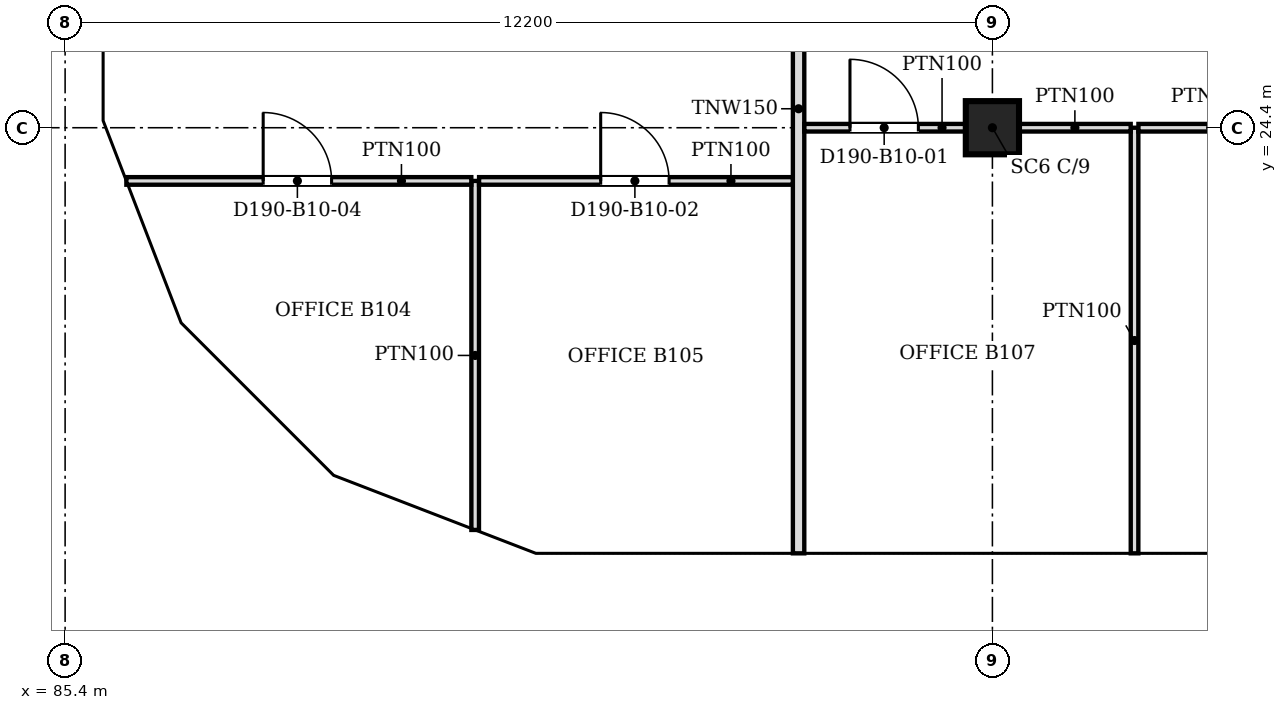
"""IFC4 building model, lengths in metres.
Left out: names, types, materials, properties, quantities, classifications, styles, units other than length and angle.
Written with IfcOpenShell. Run it as: python <this file> out.ifc"""

import sys

from ifc_helpers import new_model, si_unit, direction, frame, frame_2d, origin, origin_2d, place, context, subcontext, project, spatial, polyline, rectangle, outline, extrude, faceted_brep, source, transform, mapped, element, fill, save


model = new_model("IFC4")
c1 = context("Model", 3, precision=1e-05, world=origin(), true_north=direction((0.0, 1.0)))
c2 = subcontext(c1, "Body", "Model", "MODEL_VIEW")
j1 = project(units=[si_unit("LENGTHUNIT", "METRE"), si_unit("PLANEANGLEUNIT", "RADIAN")], contexts=[c1])
p1 = place(None, origin())
s1 = spatial("IfcSite", under=j1, at=p1, CompositionType="ELEMENT")
p2 = place(p1, origin())
s2 = spatial("IfcBuilding", under=s1, at=p2, CompositionType="ELEMENT")
p3 = place(p2, frame((0.0, 0.0, 95.2)))
s3 = spatial("IfcBuildingStorey", under=s2, at=p3, CompositionType="ELEMENT", Elevation=95.2)
p4 = place(p3, frame((97.6, 24.4, 0.0), z_axis=(0.0, 0.0, 1.0), x_axis=(1.0, 0.0, 0.0)))
e1 = element("IfcColumn", 1, at=p4, inside=s3, PredefinedType="COLUMN", context=c2, shape_type="SweptSolid", body=[
    extrude(rectangle(XDim=0.7, YDim=0.7, at=origin_2d()), origin(), (0.0, 0.0, 1.0), 3.6),
])
m1 = source(origin(), c2, "Body", "Brep", [
    faceted_brep([(3.05, -0.25, 0.0), (0.047, -0.25, 3.8), (0.0, -0.25, 3.74), (0.0, -0.25, 0.0), (0.093, 0.25, 3.741), (3.05, 0.25, 0.0), (0.093, 0.25, 0.0), (0.047, 0.0, 3.8)], [[[0, 1, 2, 3]], [[4, 5, 6]], [[5, 4, 7, 1, 0]], [[2, 1, 7]], [[6, 5, 0, 3]], [[6, 3, 2, 7, 4]]]),
])
p5 = place(p3, frame((91.5, 18.55, 0.0), z_axis=(0.0, 0.0, 1.0), x_axis=(1.0, 0.0, 0.0)))
e2 = element("IfcWall", 2, at=p5, inside=s3, PredefinedType="SOLIDWALL", context=c2, shape_type="MappedRepresentation", body=[
    mapped(m1, transform((0.0, 0.0, 0.0), scale=1.0)),
])
m2 = source(origin(), c2, "Body", "SweptSolid", [
    extrude(outline(polyline([(2.534, 0.25), (0.247, 3.144), (0.247, 0.25), (2.534, 0.25)])), frame((0.0, 0.26, 0.0), z_axis=(0.0, -1.0, 0.0), x_axis=(1.0, 0.0, 0.0)), (0.0, 0.0, 1.0), 0.52),
])
p6 = place(p5, origin())
e3 = element("IfcOpeningElement", 3, at=p6, cuts=e2, PredefinedType="OPENING", context=c2, shape_type="MappedRepresentation", body=[
    mapped(m2, transform((0.0, 0.0, 0.0), scale=1.0)),
])
m3 = source(origin(), c2, "Body", "Brep", [
    faceted_brep([(2.997, -0.25, 3.741), (2.95, -0.25, 3.8), (0.0, -0.25, 0.0), (2.997, -0.25, 0.0), (0.053, 0.25, 0.068), (2.904, 0.25, 3.74), (2.904, 0.25, 0.0), (0.053, 0.25, 0.0), (2.95, 0.0, 3.8), (0.0, 0.0, 0.0)], [[[0, 1, 2, 3]], [[4, 5, 6, 7]], [[8, 1, 0]], [[5, 4, 9, 2, 1, 8]], [[7, 6, 3, 2, 9]], [[7, 9, 4]], [[3, 6, 5, 8, 0]]]),
])
p7 = place(p3, frame((88.794, 19.612, 0.0), z_axis=(0.0, 0.0, 1.0), x_axis=(0.933000876937, -0.359874094142, 0.0)))
e4 = element("IfcWall", 4, at=p7, inside=s3, PredefinedType="SOLIDWALL", context=c2, shape_type="MappedRepresentation", body=[
    mapped(m3, transform((0.0, 0.0, 0.0), scale=1.0)),
])
m4 = source(origin(), c2, "Body", "SweptSolid", [
    extrude(outline(polyline([(2.75, 3.135), (0.511, 0.25), (2.75, 0.25), (2.75, 3.135)])), frame((0.0, 0.26, 0.0), z_axis=(0.0, -1.0, 0.0), x_axis=(1.0, 0.0, 0.0)), (0.0, 0.0, 1.0), 0.52),
])
p8 = place(p7, origin())
e5 = element("IfcOpeningElement", 5, at=p8, cuts=e4, PredefinedType="OPENING", context=c2, shape_type="MappedRepresentation", body=[
    mapped(m4, transform((0.0, 0.0, 0.0), scale=1.0)),
])
m5 = source(origin(), c2, "Body", "Brep", [
    faceted_brep([(6.1, -0.25, 0.0), (3.05, -0.25, 3.8), (0.0, -0.25, 0.0), (6.1, -0.25, 0.0), (0.0, 0.25, 0.0), (3.05, 0.25, 3.8), (6.1, 0.25, 0.0), (6.1, 0.25, 0.0)], [[[0, 1, 2, 3]], [[4, 5, 6, 7]], [[6, 5, 1, 0]], [[5, 4, 2, 1]], [[4, 7, 3, 2]], [[3, 7, 6, 0]]]),
])
p9 = place(p3, frame((94.55, 18.55, 0.0), z_axis=(0.0, 0.0, 1.0), x_axis=(1.0, 0.0, 0.0)))
e6 = element("IfcWall", 6, at=p9, inside=s3, PredefinedType="SOLIDWALL", context=c2, shape_type="MappedRepresentation", body=[
    mapped(m5, transform((0.0, 0.0, 0.0), scale=1.0)),
])
m6 = source(origin(), c2, "Body", "SweptSolid", [
    extrude(outline(polyline([(5.579, 0.25), (3.05, 3.401), (0.521, 0.25), (5.579, 0.25)])), frame((0.0, 0.26, 0.0), z_axis=(0.0, -1.0, 0.0), x_axis=(1.0, 0.0, 0.0)), (0.0, 0.0, 1.0), 0.52),
])
p10 = place(p9, origin())
e7 = element("IfcOpeningElement", 7, at=p10, cuts=e6, PredefinedType="OPENING", context=c2, shape_type="MappedRepresentation", body=[
    mapped(m6, transform((0.0, 0.0, 0.0), scale=1.0)),
])
m7 = source(origin(), c2, "Body", "Brep", [
    faceted_brep([(6.053, -0.25, 0.0), (3.05, -0.25, 3.8), (0.0, -0.25, 0.0), (0.0, 0.25, 0.0), (3.05, 0.25, 3.8), (6.007, 0.25, 0.059), (6.007, 0.25, 0.0), (6.053, 0.0, 0.0)], [[[0, 1, 2]], [[3, 4, 5, 6]], [[5, 4, 1, 0, 7]], [[4, 3, 2, 1]], [[3, 6, 7, 0, 2]], [[7, 6, 5]]]),
])
p11 = place(p3, frame((85.65, 30.5, 0.0), z_axis=(0.0, 0.0, 1.0), x_axis=(0.0, -1.0, 0.0)))
e8 = element("IfcWall", 8, at=p11, inside=s3, PredefinedType="SOLIDWALL", context=c2, shape_type="MappedRepresentation", body=[
    mapped(m7, transform((0.0, 0.0, 0.0), scale=1.0)),
])
m8 = source(origin(), c2, "Body", "SweptSolid", [
    extrude(outline(polyline([(5.537, 0.25), (3.049, 3.399), (0.521, 0.25), (5.537, 0.25)])), frame((0.0, 0.26, 0.0), z_axis=(0.0, -1.0, 0.0), x_axis=(1.0, 0.0, 0.0)), (0.0, 0.0, 1.0), 0.52),
])
p12 = place(p11, origin())
e9 = element("IfcOpeningElement", 9, at=p12, cuts=e8, PredefinedType="OPENING", context=c2, shape_type="MappedRepresentation", body=[
    mapped(m8, transform((0.0, 0.0, 0.0), scale=1.0)),
])
m9 = source(origin(), c2, "Body", "Brep", [
    faceted_brep([(3.003, -0.25, 3.732), (2.95, -0.25, 3.8), (0.0, -0.25, 0.0), (3.003, -0.25, 0.0), (0.047, 0.25, 0.06), (2.898, 0.25, 3.732), (2.898, 0.25, 0.0), (0.047, 0.25, 0.0), (2.95, 0.0, 3.8), (0.0, 0.0, 0.0)], [[[0, 1, 2, 3]], [[4, 5, 6, 7]], [[8, 1, 0]], [[5, 4, 9, 2, 1, 8]], [[7, 6, 3, 2, 9]], [[7, 9, 4]], [[3, 6, 5, 8, 0]]]),
])
p13 = place(p3, frame((85.65, 24.447, 0.0), z_axis=(0.0, 0.0, 1.0), x_axis=(0.35992665181, -0.932980602862, 0.0)))
e10 = element("IfcWall", 10, at=p13, inside=s3, PredefinedType="SOLIDWALL", context=c2, shape_type="MappedRepresentation", body=[
    mapped(m9, transform((0.0, 0.0, 0.0), scale=1.0)),
])
p14 = place(p13, origin())
e11 = element("IfcOpeningElement", 11, at=p14, cuts=e10, PredefinedType="OPENING", context=c2, shape_type="MappedRepresentation", body=[
    mapped(m4, transform((0.0, 0.0, 0.0), scale=1.0)),
])
m10 = source(origin(), c2, "Body", "Brep", [
    faceted_brep([(2.997, -0.25, 0.0), (0.053, -0.25, 3.8), (0.0, -0.25, 3.732), (0.0, -0.25, 0.0), (0.106, 0.25, 3.732), (2.944, 0.25, 0.068), (2.944, 0.25, 0.0), (0.106, 0.25, 0.0), (0.053, 0.0, 3.8), (2.997, 0.0, 0.0)], [[[0, 1, 2, 3]], [[4, 5, 6, 7]], [[5, 4, 8, 1, 0, 9]], [[2, 1, 8]], [[7, 6, 9, 0, 3]], [[7, 3, 2, 8, 4]], [[9, 6, 5]]]),
])
p15 = place(p3, frame((86.675, 21.731, 0.0), z_axis=(0.0, 0.0, 1.0), x_axis=(0.707106781187, -0.707106781187, 0.0)))
e12 = element("IfcWall", 12, at=p15, inside=s3, PredefinedType="SOLIDWALL", context=c2, shape_type="MappedRepresentation", body=[
    mapped(m10, transform((0.0, 0.0, 0.0), scale=1.0)),
])
m11 = source(origin(), c2, "Body", "SweptSolid", [
    extrude(outline(polyline([(2.487, 0.25), (0.253, 3.134), (0.253, 0.25), (2.487, 0.25)])), frame((0.0, 0.26, 0.0), z_axis=(0.0, -1.0, 0.0), x_axis=(1.0, 0.0, 0.0)), (0.0, 0.0, 1.0), 0.52),
])
p16 = place(p15, origin())
e13 = element("IfcOpeningElement", 13, at=p16, cuts=e12, PredefinedType="OPENING", context=c2, shape_type="MappedRepresentation", body=[
    mapped(m11, transform((0.0, 0.0, 0.0), scale=1.0)),
])
p17 = place(p2, frame((0.0, 0.0, 99.0)))
s4 = spatial("IfcBuildingStorey", under=s2, at=p17, CompositionType="ELEMENT", Elevation=99.0)
m12 = source(origin(), c2, "Body", "Brep", [
    faceted_brep([(3.003, -0.25, 0.0), (6.053, -0.25, 3.8), (3.003, -0.25, 7.6), (0.0, -0.25, 3.8), (0.047, 0.25, 3.859), (3.003, 0.25, 7.6), (6.053, 0.25, 3.8), (3.003, 0.25, 0.0), (0.047, 0.25, 3.741), (0.0, 0.0, 3.8)], [[[0, 1, 2, 3]], [[4, 5, 6, 7, 8]], [[7, 6, 1, 0]], [[6, 5, 2, 1]], [[5, 4, 9, 3, 2]], [[8, 7, 0, 3, 9]], [[8, 9, 4]]]),
])
p18 = place(p17, frame((91.547, 18.55, -3.8), z_axis=(0.0, 0.0, 1.0), x_axis=(1.0, 0.0, 0.0)))
e14 = element("IfcWall", 14, at=p18, inside=s4, PredefinedType="SOLIDWALL", context=c2, shape_type="MappedRepresentation", body=[
    mapped(m12, transform((0.0, 0.0, 0.0), scale=1.0)),
])
m13 = source(origin(), c2, "Body", "SweptSolid", [
    extrude(outline(polyline([(3.005, 0.401), (5.733, 3.8), (3.005, 7.199), (0.319, 3.8), (3.005, 0.401)])), frame((0.0, 0.26, 0.0), z_axis=(0.0, -1.0, 0.0), x_axis=(1.0, 0.0, 0.0)), (0.0, 0.0, 1.0), 0.52),
])
p19 = place(p18, origin())
e15 = element("IfcOpeningElement", 15, at=p19, cuts=e14, PredefinedType="OPENING", context=c2, shape_type="MappedRepresentation", body=[
    mapped(m13, transform((0.0, 0.0, 0.0), scale=1.0)),
])
m14 = source(origin(), c2, "Body", "Brep", [
    faceted_brep([(3.05, -0.25, 0.0), (6.1, -0.25, 3.8), (6.1, -0.25, 3.8), (3.05, -0.25, 7.6), (0.0, -0.25, 3.8), (0.0, 0.25, 3.8), (3.05, 0.25, 7.6), (6.1, 0.25, 3.8), (6.1, 0.25, 3.8), (3.05, 0.25, 0.0)], [[[0, 1, 2, 3, 4]], [[5, 6, 7, 8, 9]], [[9, 8, 1, 0]], [[7, 6, 3, 2]], [[6, 5, 4, 3]], [[5, 9, 0, 4]], [[1, 8, 7, 2]]]),
])
p20 = place(p17, frame((97.6, 18.55, -3.8), z_axis=(0.0, 0.0, 1.0), x_axis=(1.0, 0.0, 0.0)))
e16 = element("IfcWall", 16, at=p20, inside=s4, PredefinedType="SOLIDWALL", context=c2, shape_type="MappedRepresentation", body=[
    mapped(m14, transform((0.0, 0.0, 0.0), scale=1.0)),
])
m15 = source(origin(), c2, "Body", "SweptSolid", [
    extrude(outline(polyline([(3.05, 0.399), (5.78, 3.8), (3.05, 7.201), (0.321, 3.8), (3.05, 0.399)])), frame((0.0, 0.26, 0.0), z_axis=(0.0, -1.0, 0.0), x_axis=(1.0, 0.0, 0.0)), (0.0, 0.0, 1.0), 0.52),
])
p21 = place(p20, origin())
e17 = element("IfcOpeningElement", 17, at=p21, cuts=e16, PredefinedType="OPENING", context=c2, shape_type="MappedRepresentation", body=[
    mapped(m15, transform((0.0, 0.0, 0.0), scale=1.0)),
])
m16 = source(origin(), c2, "Body", "Brep", [
    faceted_brep([(3.003, -0.25, 0.0), (3.05, -0.25, 0.06), (3.05, -0.25, 7.54), (3.003, -0.25, 7.6), (0.0, -0.25, 3.8), (0.0, 0.25, 3.8), (2.957, 0.25, 7.541), (2.957, 0.25, 0.059), (3.003, 0.0, 0.0), (3.003, 0.0, 7.6)], [[[0, 1, 2, 3, 4]], [[5, 6, 7]], [[1, 0, 8]], [[9, 3, 2]], [[6, 5, 4, 3, 9]], [[5, 7, 8, 0, 4]], [[1, 8, 7, 6, 9, 2]]]),
])
p22 = place(p17, frame((85.65, 27.45, -3.8), z_axis=(0.0, 0.0, 1.0), x_axis=(0.0, -1.0, 0.0)))
e18 = element("IfcWall", 18, at=p22, inside=s4, PredefinedType="SOLIDWALL", context=c2, shape_type="MappedRepresentation", body=[
    mapped(m16, transform((0.0, 0.0, 0.0), scale=1.0)),
])
m17 = source(origin(), c2, "Body", "SweptSolid", [
    extrude(outline(polyline([(2.803, 6.944), (0.319, 3.8), (2.803, 0.656), (2.803, 6.944)])), frame((0.0, 0.26, 0.0), z_axis=(0.0, -1.0, 0.0), x_axis=(1.0, 0.0, 0.0)), (0.0, 0.0, 1.0), 0.52),
])
p23 = place(p22, origin())
e19 = element("IfcOpeningElement", 19, at=p23, cuts=e18, PredefinedType="OPENING", context=c2, shape_type="MappedRepresentation", body=[
    mapped(m17, transform((0.0, 0.0, 0.0), scale=1.0)),
])
m18 = source(origin(), c2, "Body", "Brep", [
    faceted_brep([(0.047, -0.25, 0.0), (2.997, -0.25, 3.8), (0.047, -0.25, 7.6), (0.0, -0.25, 7.541), (0.0, -0.25, 0.059), (0.093, 0.25, 7.54), (2.944, 0.25, 3.868), (2.944, 0.25, 3.732), (0.093, 0.25, 0.06), (2.997, 0.0, 3.8), (0.047, 0.0, 0.0), (0.047, 0.0, 7.6)], [[[0, 1, 2, 3, 4]], [[5, 6, 7, 8]], [[8, 7, 9, 1, 0, 10]], [[6, 5, 11, 2, 1, 9]], [[3, 2, 11]], [[10, 0, 4]], [[8, 10, 4, 3, 11, 5]], [[9, 7, 6]]]),
])
p24 = place(p17, frame((85.633, 24.49, -3.8), z_axis=(0.0, 0.0, 1.0), x_axis=(0.359901446078, -0.932990326376, 0.0)))
e20 = element("IfcWall", 20, at=p24, inside=s4, PredefinedType="SOLIDWALL", context=c2, shape_type="MappedRepresentation", body=[
    mapped(m18, transform((0.0, 0.0, 0.0), scale=1.0)),
])
m19 = source(origin(), c2, "Body", "SweptSolid", [
    extrude(outline(polyline([(0.247, 0.665), (2.681, 3.8), (0.247, 6.935), (0.247, 0.665)])), frame((0.0, 0.26, 0.0), z_axis=(0.0, -1.0, 0.0), x_axis=(1.0, 0.0, 0.0)), (0.0, 0.0, 1.0), 0.52),
])
p25 = place(p24, origin())
e21 = element("IfcOpeningElement", 21, at=p25, cuts=e20, PredefinedType="OPENING", context=c2, shape_type="MappedRepresentation", body=[
    mapped(m19, transform((0.0, 0.0, 0.0), scale=1.0)),
])
m20 = source(origin(), c2, "Body", "Brep", [
    faceted_brep([(2.944, -0.25, 0.0), (2.997, -0.25, 0.068), (2.997, -0.25, 7.532), (2.944, -0.25, 7.6), (0.0, -0.25, 3.8), (0.053, 0.25, 3.868), (2.891, 0.25, 7.532), (2.891, 0.25, 0.068), (0.053, 0.25, 3.732), (2.944, 0.0, 0.0), (2.944, 0.0, 7.6), (0.0, 0.0, 3.8)], [[[0, 1, 2, 3, 4]], [[5, 6, 7, 8]], [[1, 0, 9]], [[10, 3, 2]], [[6, 5, 11, 4, 3, 10]], [[8, 7, 9, 0, 4, 11]], [[8, 11, 5]], [[1, 9, 7, 6, 10, 2]]]),
])
p26 = place(p17, frame((86.712, 21.694, -3.8), z_axis=(0.0, 0.0, 1.0), x_axis=(0.707066050402, -0.707147509625, 0.0)))
e22 = element("IfcWall", 22, at=p26, inside=s4, PredefinedType="SOLIDWALL", context=c2, shape_type="MappedRepresentation", body=[
    mapped(m20, transform((0.0, 0.0, 0.0), scale=1.0)),
])
m21 = source(origin(), c2, "Body", "SweptSolid", [
    extrude(outline(polyline([(2.744, 6.934), (0.316, 3.8), (2.744, 0.666), (2.744, 6.934)])), frame((0.0, 0.26, 0.0), z_axis=(0.0, -1.0, 0.0), x_axis=(1.0, 0.0, 0.0)), (0.0, 0.0, 1.0), 0.52),
])
p27 = place(p26, origin())
e23 = element("IfcOpeningElement", 23, at=p27, cuts=e22, PredefinedType="OPENING", context=c2, shape_type="MappedRepresentation", body=[
    mapped(m21, transform((0.0, 0.0, 0.0), scale=1.0)),
])
m22 = source(origin(), c2, "Body", "Brep", [
    faceted_brep([(0.053, -0.25, 0.0), (3.003, -0.25, 3.8), (0.053, -0.25, 7.6), (0.0, -0.25, 7.532), (0.0, -0.25, 0.068), (0.106, 0.25, 7.532), (2.957, 0.25, 3.86), (2.957, 0.25, 3.74), (0.106, 0.25, 0.068), (3.003, 0.0, 3.8), (0.053, 0.0, 0.0), (0.053, 0.0, 7.6)], [[[0, 1, 2, 3, 4]], [[5, 6, 7, 8]], [[8, 7, 9, 1, 0, 10]], [[6, 5, 11, 2, 1, 9]], [[3, 2, 11]], [[10, 0, 4]], [[8, 10, 4, 3, 11, 5]], [[9, 7, 6]]]),
])
p28 = place(p17, frame((88.744, 19.631, -3.8), z_axis=(0.0, 0.0, 1.0), x_axis=(0.932997369089, -0.359883188373, 0.0)))
e24 = element("IfcWall", 24, at=p28, inside=s4, PredefinedType="SOLIDWALL", context=c2, shape_type="MappedRepresentation", body=[
    mapped(m22, transform((0.0, 0.0, 0.0), scale=1.0)),
])
m23 = source(origin(), c2, "Body", "SweptSolid", [
    extrude(outline(polyline([(0.253, 0.665), (2.687, 3.8), (0.253, 6.935), (0.253, 0.665)])), frame((0.0, 0.26, 0.0), z_axis=(0.0, -1.0, 0.0), x_axis=(1.0, 0.0, 0.0)), (0.0, 0.0, 1.0), 0.52),
])
p29 = place(p28, origin())
e25 = element("IfcOpeningElement", 25, at=p29, cuts=e24, PredefinedType="OPENING", context=c2, shape_type="MappedRepresentation", body=[
    mapped(m23, transform((0.0, 0.0, 0.0), scale=1.0)),
])
p30 = place(p3, frame((95.05, 18.8, 0.0), z_axis=(0.0, 0.0, 1.0), x_axis=(0.0, 1.0, 0.0)))
e26 = element("IfcWall", 26, at=p30, inside=s3, PredefinedType="PARTITIONING", context=c2, shape_type="SweptSolid", body=[
    extrude(rectangle(XDim=11.699, YDim=0.15, at=frame_2d((5.85, 0.0))), origin(), (0.0, 0.0, 1.0), 3.067),
])
p31 = place(p3, frame((99.47, 18.8, 0.0), z_axis=(0.0, 0.0, 1.0), x_axis=(0.0, 1.0, 0.0)))
e27 = element("IfcWall", 27, at=p31, inside=s3, PredefinedType="PARTITIONING", context=c2, shape_type="SweptSolid", body=[
    extrude(rectangle(XDim=5.6, YDim=0.1, at=frame_2d((2.8, 0.0))), origin(), (0.0, 0.0, 1.0), 3.067),
])
p32 = place(p3, frame((90.795, 19.108, 0.0), z_axis=(0.0, 0.0, 1.0), x_axis=(0.0, 1.0, 0.0)))
e28 = element("IfcWall", 28, at=p32, inside=s3, PredefinedType="PARTITIONING", context=c2, shape_type="SweptSolid", body=[
    extrude(rectangle(XDim=4.592, YDim=0.1, at=frame_2d((2.296, 0.0))), origin(), (0.0, 0.0, 1.0), 3.067),
])
p33 = place(p3, frame((90.744, 23.7, 0.0), z_axis=(0.0, 0.0, 1.0), x_axis=(-1.0, 0.0, 0.0)))
e29 = element("IfcWall", 29, at=p33, inside=s3, PredefinedType="PARTITIONING", context=c2, shape_type="SweptSolid", body=[
    extrude(rectangle(XDim=4.538, YDim=0.1, at=frame_2d((2.269, 0.0))), origin(), (0.0, 0.0, 1.0), 3.067),
])
m24 = source(origin(), c2, "Body", "SweptSolid", [
    extrude(rectangle(XDim=0.9, YDim=2.1, at=frame_2d((0.45, 1.05))), frame((0.0, 0.06, 0.0), z_axis=(0.0, -1.0, 0.0), x_axis=(1.0, 0.0, 0.0)), (0.0, 0.0, 1.0), 0.12),
])
p34 = place(p33, frame((1.838, 0.0, 0.0)))
e30 = element("IfcOpeningElement", 30, at=p34, cuts=e29, PredefinedType="OPENING", context=c2, shape_type="MappedRepresentation", body=[
    mapped(m24, transform((0.0, 0.0, 0.0), scale=1.0)),
])
p35 = place(p3, frame((94.974, 23.7, 0.0), z_axis=(0.0, 0.0, 1.0), x_axis=(-1.0, 0.0, 0.0)))
e31 = element("IfcWall", 31, at=p35, inside=s3, PredefinedType="PARTITIONING", context=c2, shape_type="SweptSolid", body=[
    extrude(rectangle(XDim=4.128, YDim=0.1, at=frame_2d((2.064, 0.0))), origin(), (0.0, 0.0, 1.0), 3.067),
])
p36 = place(p35, frame((1.628, 0.0, 0.0)))
e32 = element("IfcOpeningElement", 32, at=p36, cuts=e31, PredefinedType="OPENING", context=c2, shape_type="MappedRepresentation", body=[
    mapped(m24, transform((0.0, 0.0, 0.0), scale=1.0)),
])
p37 = place(p3, frame((97.249, 24.4, 0.0), z_axis=(0.0, 0.0, 1.0), x_axis=(-1.0, 0.0, 0.0)))
e33 = element("IfcWall", 33, at=p37, inside=s3, PredefinedType="PARTITIONING", context=c2, shape_type="SweptSolid", body=[
    extrude(rectangle(XDim=2.123, YDim=0.1, at=frame_2d((1.062, 0.0))), origin(), (0.0, 0.0, 1.0), 3.067),
])
p38 = place(p37, frame((0.623, 0.0, 0.0)))
e34 = element("IfcOpeningElement", 34, at=p38, cuts=e33, PredefinedType="OPENING", context=c2, shape_type="MappedRepresentation", body=[
    mapped(m24, transform((0.0, 0.0, 0.0), scale=1.0)),
])
p39 = place(p3, frame((97.951, 24.4, 0.0), z_axis=(0.0, 0.0, 1.0), x_axis=(1.0, 0.0, 0.0)))
e35 = element("IfcWall", 35, at=p39, inside=s3, PredefinedType="PARTITIONING", context=c2, shape_type="SweptSolid", body=[
    extrude(rectangle(XDim=1.468, YDim=0.1, at=frame_2d((0.734, 0.0))), origin(), (0.0, 0.0, 1.0), 3.067),
])
p40 = place(p3, frame((104.124, 24.4, 0.0), z_axis=(0.0, 0.0, 1.0), x_axis=(-1.0, 0.0, 0.0)))
e36 = element("IfcWall", 36, at=p40, inside=s3, PredefinedType="PARTITIONING", context=c2, shape_type="SweptSolid", body=[
    extrude(rectangle(XDim=4.603, YDim=0.1, at=frame_2d((2.301, 0.0))), origin(), (0.0, 0.0, 1.0), 3.067),
])
p41 = place(p40, frame((1.803, 0.0, 0.0)))
e37 = element("IfcOpeningElement", 37, at=p41, cuts=e36, PredefinedType="OPENING", context=c2, shape_type="MappedRepresentation", body=[
    mapped(m24, transform((0.0, 0.0, 0.0), scale=1.0)),
])
m25 = source(origin(), c2, "Body", "SweptSolid", [
    extrude(rectangle(XDim=0.9, YDim=2.1, at=frame_2d((0.45, 1.05))), frame((0.0, 0.025, 0.0), z_axis=(0.0, -1.0, 0.0), x_axis=(1.0, 0.0, 0.0)), (0.0, 0.0, 1.0), 0.05),
])
p42 = place(p38, origin())
e38 = element("IfcDoor", 38, at=p42, inside=s3, OperationType="SINGLE_SWING_RIGHT", PredefinedType="DOOR", context=c2, shape_type="MappedRepresentation", body=[
    mapped(m25, transform((0.0, 0.0, 0.0), scale=1.0)),
])
fill(e34, e38)
p43 = place(p36, origin())
e39 = element("IfcDoor", 39, at=p43, inside=s3, OperationType="SINGLE_SWING_RIGHT", PredefinedType="DOOR", context=c2, shape_type="MappedRepresentation", body=[
    mapped(m25, transform((0.0, 0.0, 0.0), scale=1.0)),
])
fill(e32, e39)
p44 = place(p34, origin())
e40 = element("IfcDoor", 40, at=p44, inside=s3, OperationType="SINGLE_SWING_RIGHT", PredefinedType="DOOR", context=c2, shape_type="MappedRepresentation", body=[
    mapped(m25, transform((0.0, 0.0, 0.0), scale=1.0)),
])
fill(e30, e40)
save(model, sys.argv[1])
